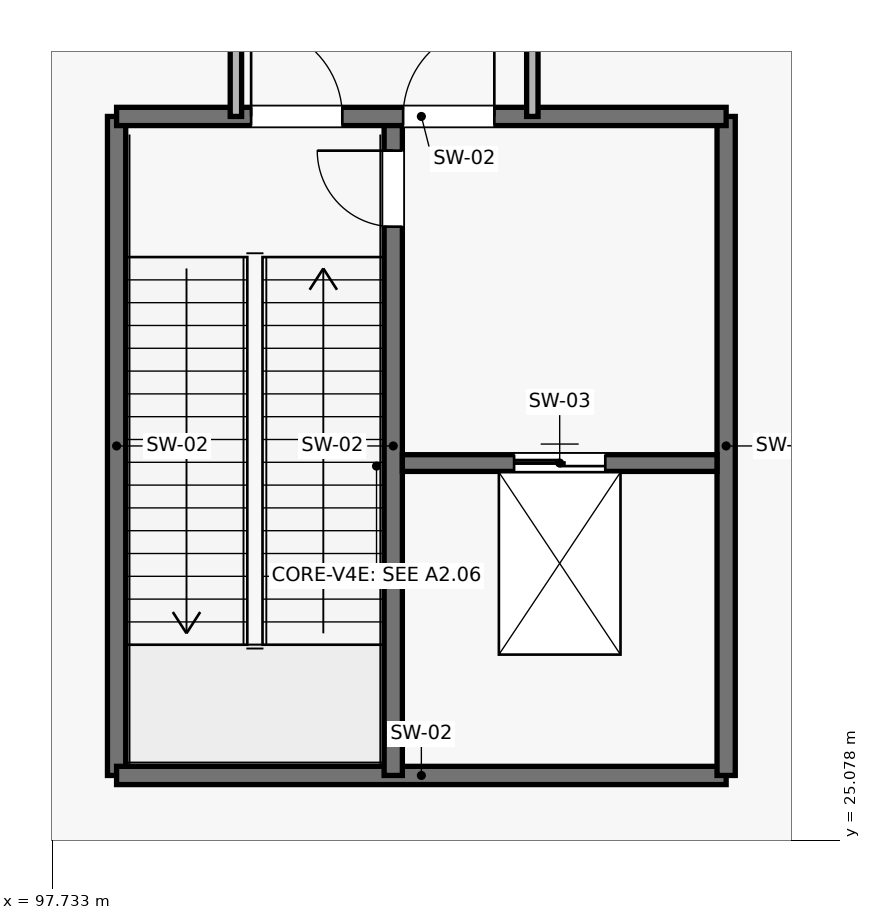
"""IFC4 building model, lengths in metres.
Left out: names, types, materials, properties, quantities, classifications, styles, units other than length and angle.
Written with IfcOpenShell. Run it as: python <this file> out.ifc"""

import sys

from ifc_helpers import new_model, si_unit, direction, frame, frame_2d, origin, place, context, subcontext, project, spatial, rectangle, extrude, element, fill, save


model = new_model("IFC4")
c1 = context("Model", 3, precision=1e-05, world=origin(), true_north=direction((0.0, 1.0)))
c2 = subcontext(c1, "Body", "Model", "MODEL_VIEW")
j1 = project(units=[si_unit("LENGTHUNIT", "METRE"), si_unit("PLANEANGLEUNIT", "RADIAN")], contexts=[c1])
p1 = place(None, origin())
s1 = spatial("IfcSite", under=j1, at=p1, CompositionType="ELEMENT")
p2 = place(p1, origin())
s2 = spatial("IfcBuilding", under=s1, at=p2, CompositionType="ELEMENT")
p3 = place(p2, origin())
s3 = spatial("IfcBuildingStorey", under=s2, at=p3, CompositionType="ELEMENT", Elevation=0.0)
p4 = place(p3, frame((98.58, 34.6, 0.0), z_axis=(0.0, 0.0, 1.0), x_axis=(0.0, -1.0, 0.0)))
e1 = element("IfcWall", 1, at=p4, inside=s3, PredefinedType="SHEAR", context=c2, shape_type="SweptSolid", body=[
    extrude(rectangle(XDim=8.67, YDim=0.24, at=frame_2d((4.335, 0.0))), origin(), (0.0, 0.0, 1.0), 6.29),
])
p5 = place(p3, frame((98.58, 25.93, 0.0), z_axis=(0.0, 0.0, 1.0), x_axis=(1.0, 0.0, 0.0)))
e2 = element("IfcWall", 2, at=p5, inside=s3, PredefinedType="SHEAR", context=c2, shape_type="SweptSolid", body=[
    extrude(rectangle(XDim=8.02, YDim=0.24, at=frame_2d((4.01, 0.0))), origin(), (0.0, 0.0, 1.0), 6.29),
])
p6 = place(p3, frame((102.22, 25.93, 0.0), z_axis=(0.0, 0.0, 1.0), x_axis=(0.0, 1.0, 0.0)))
e3 = element("IfcWall", 3, at=p6, inside=s3, PredefinedType="SHEAR", context=c2, shape_type="SweptSolid", body=[
    extrude(rectangle(XDim=8.67, YDim=0.24, at=frame_2d((4.335, 0.0))), origin(), (0.0, 0.0, 1.0), 6.29),
])
p7 = place(p6, frame((7.22, 0.0, 0.0)))
e4 = element("IfcOpeningElement", 4, at=p7, cuts=e3, PredefinedType="OPENING", context=c2, shape_type="SweptSolid", body=[
    extrude(rectangle(XDim=1.0, YDim=2.2, at=frame_2d((0.5, 1.1))), frame((0.0, 0.135, 0.0), z_axis=(0.0, -1.0, 0.0), x_axis=(1.0, 0.0, 0.0)), (0.0, 0.0, 1.0), 0.27),
])
p8 = place(p3, frame((106.6, 25.93, 0.0), z_axis=(0.0, 0.0, 1.0), x_axis=(0.0, 1.0, 0.0)))
e5 = element("IfcWall", 5, at=p8, inside=s3, PredefinedType="SHEAR", context=c2, shape_type="SweptSolid", body=[
    extrude(rectangle(XDim=8.67, YDim=0.24, at=frame_2d((4.335, 0.0))), origin(), (0.0, 0.0, 1.0), 6.29),
])
p9 = place(p3, frame((98.58, 34.6, 0.0), z_axis=(0.0, 0.0, 1.0), x_axis=(1.0, 0.0, 0.0)))
e6 = element("IfcWall", 6, at=p9, inside=s3, PredefinedType="SHEAR", context=c2, shape_type="SweptSolid", body=[
    extrude(rectangle(XDim=8.02, YDim=0.24, at=frame_2d((4.01, 0.0))), origin(), (0.0, 0.0, 1.0), 6.29),
])
p10 = place(p9, frame((1.77, 0.0, 0.0)))
e7 = element("IfcOpeningElement", 7, at=p10, cuts=e6, PredefinedType="OPENING", context=c2, shape_type="SweptSolid", body=[
    extrude(rectangle(XDim=1.2, YDim=2.2, at=frame_2d((0.6, 1.1))), frame((0.0, 0.135, 0.0), z_axis=(0.0, -1.0, 0.0), x_axis=(1.0, 0.0, 0.0)), (0.0, 0.0, 1.0), 0.27),
])
p11 = place(p9, frame((3.77, 0.0, 0.0)))
e8 = element("IfcOpeningElement", 8, at=p11, cuts=e6, PredefinedType="OPENING", context=c2, shape_type="SweptSolid", body=[
    extrude(rectangle(XDim=1.2, YDim=2.2, at=frame_2d((0.6, 1.1))), frame((0.0, 0.135, 0.0), z_axis=(0.0, -1.0, 0.0), x_axis=(1.0, 0.0, 0.0)), (0.0, 0.0, 1.0), 0.27),
])
p12 = place(p3, frame((102.34, 30.04, 0.0), z_axis=(0.0, 0.0, 1.0), x_axis=(1.0, 0.0, 0.0)))
e9 = element("IfcWall", 9, at=p12, inside=s3, PredefinedType="SHEAR", context=c2, shape_type="SweptSolid", body=[
    extrude(rectangle(XDim=4.14, YDim=0.22, at=frame_2d((2.07, 0.0))), origin(), (0.0, 0.0, 1.0), 6.29),
])
p13 = place(p12, frame((1.47, 0.0, 0.0)))
e10 = element("IfcOpeningElement", 10, at=p13, cuts=e9, PredefinedType="OPENING", context=c2, shape_type="SweptSolid", body=[
    extrude(rectangle(XDim=1.2, YDim=2.2, at=frame_2d((0.6, 1.1))), frame((0.0, 0.125, 0.0), z_axis=(0.0, -1.0, 0.0), x_axis=(1.0, 0.0, 0.0)), (0.0, 0.0, 1.0), 0.25),
])
for number, where, z_axis, x_axis in (
    (11, (100.15, 34.6, 0.0), (0.0, 0.0, 1.0), (0.0, 1.0, 0.0)),
    (12, (104.05, 34.6, 0.0), (0.0, 0.0, 1.0), (0.0, 1.0, 0.0)),
):
    element("IfcWall", number, at=place(p3, frame(where, z_axis=z_axis, x_axis=x_axis)), inside=s3, PredefinedType="PARTITIONING", context=c2, shape_type="SweptSolid", body=[
        extrude(rectangle(XDim=3.4, YDim=0.15, at=frame_2d((1.7, 0.0))), origin(), (0.0, 0.0, 1.0), 5.273),
    ])
p14 = place(p10, origin())
e13 = element("IfcDoor", 13, at=p14, inside=s3, OperationType="SINGLE_SWING_LEFT", PredefinedType="DOOR", context=c2, shape_type="SweptSolid", body=[
    extrude(rectangle(XDim=1.2, YDim=2.2, at=frame_2d((0.6, 1.1))), frame((0.0, 0.025, 0.0), z_axis=(0.0, -1.0, 0.0), x_axis=(1.0, 0.0, 0.0)), (0.0, 0.0, 1.0), 0.05),
])
fill(e7, e13)
p15 = place(p11, origin())
e14 = element("IfcDoor", 14, at=p15, inside=s3, OperationType="SINGLE_SWING_RIGHT", PredefinedType="DOOR", context=c2, shape_type="SweptSolid", body=[
    extrude(rectangle(XDim=1.2, YDim=2.2, at=frame_2d((0.6, 1.1))), frame((0.0, 0.025, 0.0), z_axis=(0.0, -1.0, 0.0), x_axis=(1.0, 0.0, 0.0)), (0.0, 0.0, 1.0), 0.05),
])
fill(e8, e14)
p16 = place(p7, origin())
e15 = element("IfcDoor", 15, at=p16, inside=s3, OperationType="SINGLE_SWING_RIGHT", PredefinedType="DOOR", context=c2, shape_type="SweptSolid", body=[
    extrude(rectangle(XDim=1.0, YDim=2.2, at=frame_2d((0.5, 1.1))), frame((0.0, 0.025, 0.0), z_axis=(0.0, -1.0, 0.0), x_axis=(1.0, 0.0, 0.0)), (0.0, 0.0, 1.0), 0.05),
])
fill(e4, e15)
p17 = place(p13, origin())
e16 = element("IfcDoor", 16, at=p17, inside=s3, OperationType="DOUBLE_DOOR_SLIDING", PredefinedType="DOOR", context=c2, shape_type="SweptSolid", body=[
    extrude(rectangle(XDim=1.2, YDim=2.2, at=frame_2d((0.6, 1.1))), frame((0.0, 0.025, 0.0), z_axis=(0.0, -1.0, 0.0), x_axis=(1.0, 0.0, 0.0)), (0.0, 0.0, 1.0), 0.05),
])
fill(e10, e16)
save(model, sys.argv[1])
